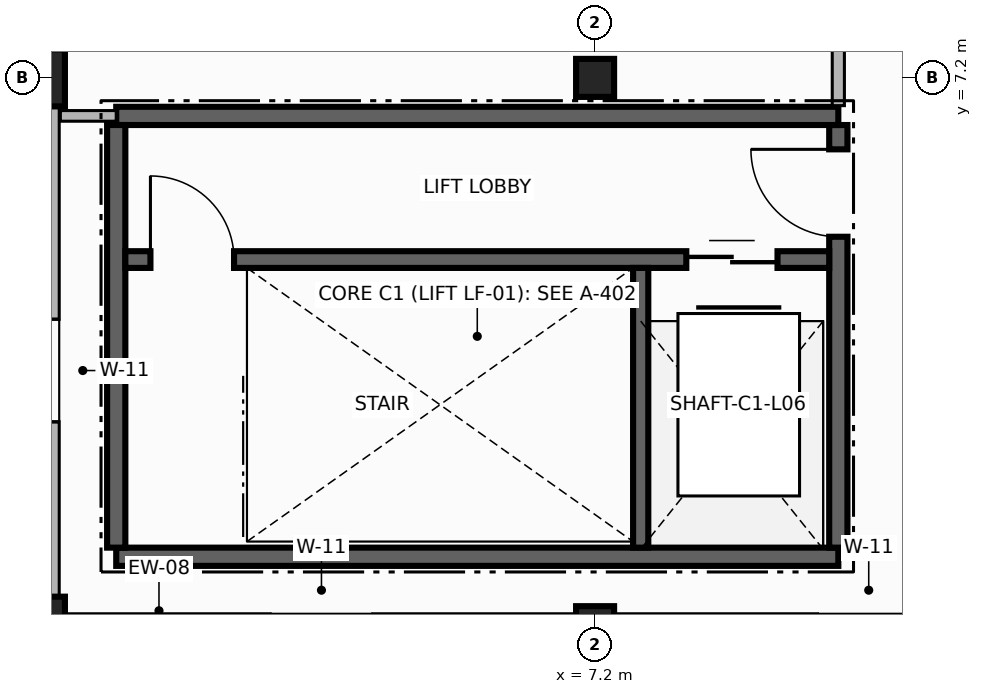
"""IFC4 building model, lengths in metres.
Left out: names, types, materials, properties, quantities, classifications, styles, units other than length and angle.
Written with IfcOpenShell. Run it as: python <this file> out.ifc"""

import sys

from ifc_helpers import new_model, si_unit, direction, frame, frame_2d, origin, origin_with_axes, origin_2d, place, context, subcontext, project, spatial, rectangle, extrude, element, fill, save


model = new_model("IFC4")
c1 = context("Model", 3, precision=1e-05, world=origin(), true_north=direction((0.0, 1.0)))
c2 = subcontext(c1, "Body", "Model", "MODEL_VIEW")
j1 = project(units=[si_unit("LENGTHUNIT", "METRE"), si_unit("PLANEANGLEUNIT", "RADIAN")], contexts=[c1])
p1 = place(None, origin())
s1 = spatial("IfcSite", under=j1, at=p1, CompositionType="ELEMENT")
p2 = place(p1, origin())
s2 = spatial("IfcBuilding", under=s1, at=p2, CompositionType="ELEMENT")
p3 = place(p2, frame((0.0, 0.0, 23.4)))
s3 = spatial("IfcBuildingStorey", under=s2, at=p3, CompositionType="ELEMENT", Elevation=23.4)
for number, where, z_axis, x_axis in (
    (1, (0.0, 0.0, 0.0), (0.0, 0.0, 1.0), (1.0, 0.0, 0.0)),
    (2, (0.0, 7.2, 0.0), (0.0, 0.0, 1.0), (1.0, 0.0, 0.0)),
):
    element("IfcColumn", number, at=place(p3, frame(where, z_axis=z_axis, x_axis=x_axis)), inside=s3, PredefinedType="PILASTER", context=c2, shape_type="SweptSolid", body=[
        extrude(rectangle(XDim=0.45, YDim=0.75, at=origin_2d()), origin(), (0.0, 0.0, 1.0), 3.36),
    ])
for number, where, z_axis, x_axis in (
    (3, (7.2, 0.0, 0.0), (0.0, 0.0, 1.0), (1.0, 0.0, 0.0)),
    (4, (7.2, 7.2, 0.0), (0.0, 0.0, 1.0), (1.0, 0.0, 0.0)),
):
    element("IfcColumn", number, at=place(p3, frame(where, z_axis=z_axis, x_axis=x_axis)), inside=s3, PredefinedType="COLUMN", context=c2, shape_type="SweptSolid", body=[
        extrude(rectangle(XDim=0.5, YDim=0.5, at=origin_2d()), origin(), (0.0, 0.0, 1.0), 3.36),
    ])
p4 = place(p3, origin_with_axes())
e5 = element("IfcWall", 5, at=p4, inside=s3, PredefinedType="SOLIDWALL", context=c2, shape_type="SweptSolid", body=[
    extrude(rectangle(XDim=7.2, YDim=0.3, at=frame_2d((3.6, 0.0))), origin(), (0.0, 0.0, 1.0), 2.69),
])
p5 = place(p4, frame((2.925, 0.0, 0.85)))
e6 = element("IfcOpeningElement", 6, at=p5, cuts=e5, PredefinedType="OPENING", context=c2, shape_type="SweptSolid", body=[
    extrude(rectangle(XDim=1.35, YDim=1.6, at=frame_2d((0.675, 0.8))), frame((0.0, 0.16, 0.0), z_axis=(0.0, -1.0, 0.0), x_axis=(1.0, 0.0, 0.0)), (0.0, 0.0, 1.0), 0.32),
])
p6 = place(p3, frame((7.2, 0.0, 0.0), z_axis=(0.0, 0.0, 1.0), x_axis=(1.0, 0.0, 0.0)))
e7 = element("IfcWall", 7, at=p6, inside=s3, PredefinedType="SOLIDWALL", context=c2, shape_type="SweptSolid", body=[
    extrude(rectangle(XDim=7.2, YDim=0.3, at=frame_2d((3.6, 0.0))), origin(), (0.0, 0.0, 1.0), 2.69),
])
p7 = place(p6, frame((2.925, 0.0, 0.85)))
e8 = element("IfcOpeningElement", 8, at=p7, cuts=e7, PredefinedType="OPENING", context=c2, shape_type="SweptSolid", body=[
    extrude(rectangle(XDim=1.35, YDim=1.6, at=frame_2d((0.675, 0.8))), frame((0.0, 0.16, 0.0), z_axis=(0.0, -1.0, 0.0), x_axis=(1.0, 0.0, 0.0)), (0.0, 0.0, 1.0), 0.32),
])
p8 = place(p3, frame((0.0, 14.4, 0.0), z_axis=(0.0, 0.0, 1.0), x_axis=(0.0, -1.0, 0.0)))
e9 = element("IfcWall", 9, at=p8, inside=s3, PredefinedType="SOLIDWALL", context=c2, shape_type="SweptSolid", body=[
    extrude(rectangle(XDim=7.2, YDim=0.3, at=frame_2d((3.6, 0.0))), origin(), (0.0, 0.0, 1.0), 2.69),
])
p9 = place(p8, frame((2.925, 0.0, 0.85)))
e10 = element("IfcOpeningElement", 10, at=p9, cuts=e9, PredefinedType="OPENING", context=c2, shape_type="SweptSolid", body=[
    extrude(rectangle(XDim=1.35, YDim=1.6, at=frame_2d((0.675, 0.8))), frame((0.0, 0.16, 0.0), z_axis=(0.0, -1.0, 0.0), x_axis=(1.0, 0.0, 0.0)), (0.0, 0.0, 1.0), 0.32),
])
p10 = place(p3, frame((0.0, 7.2, 0.0), z_axis=(0.0, 0.0, 1.0), x_axis=(0.0, -1.0, 0.0)))
e11 = element("IfcWall", 11, at=p10, inside=s3, PredefinedType="SOLIDWALL", context=c2, shape_type="SweptSolid", body=[
    extrude(rectangle(XDim=7.2, YDim=0.3, at=frame_2d((3.6, 0.0))), origin(), (0.0, 0.0, 1.0), 2.69),
])
p11 = place(p10, frame((3.175, 0.0, 0.85)))
e12 = element("IfcOpeningElement", 12, at=p11, cuts=e11, PredefinedType="OPENING", context=c2, shape_type="SweptSolid", body=[
    extrude(rectangle(XDim=1.35, YDim=1.6, at=frame_2d((0.675, 0.8))), frame((0.0, 0.16, 0.0), z_axis=(0.0, -1.0, 0.0), x_axis=(1.0, 0.0, 0.0)), (0.0, 0.0, 1.0), 0.32),
])
p12 = place(p3, frame((0.9, 0.9, 0.0), z_axis=(0.0, 0.0, 1.0), x_axis=(1.0, 0.0, 0.0)))
e13 = element("IfcWall", 13, at=p12, inside=s3, PredefinedType="SHEAR", context=c2, shape_type="SweptSolid", body=[
    extrude(rectangle(XDim=9.5, YDim=0.24, at=frame_2d((4.75, 0.0))), origin(), (0.0, 0.0, 1.0), 3.36),
])
p13 = place(p3, frame((10.4, 1.02, 0.0), z_axis=(0.0, 0.0, 1.0), x_axis=(0.0, 1.0, 0.0)))
e14 = element("IfcWall", 14, at=p13, inside=s3, PredefinedType="SHEAR", context=c2, shape_type="SweptSolid", body=[
    extrude(rectangle(XDim=5.56, YDim=0.24, at=frame_2d((2.78, 0.0))), origin(), (0.0, 0.0, 1.0), 3.36),
])
p14 = place(p13, frame((4.09, 0.0, 0.0)))
e15 = element("IfcOpeningElement", 15, at=p14, cuts=e14, PredefinedType="OPENING", context=c2, shape_type="SweptSolid", body=[
    extrude(rectangle(XDim=1.15, YDim=2.2, at=frame_2d((0.575, 1.1))), frame((0.0, 0.13, 0.0), z_axis=(0.0, -1.0, 0.0), x_axis=(1.0, 0.0, 0.0)), (0.0, 0.0, 1.0), 0.26),
])
p15 = place(p3, frame((10.4, 6.7, 0.0), z_axis=(0.0, 0.0, 1.0), x_axis=(-1.0, 0.0, 0.0)))
e16 = element("IfcWall", 16, at=p15, inside=s3, PredefinedType="SHEAR", context=c2, shape_type="SweptSolid", body=[
    extrude(rectangle(XDim=9.5, YDim=0.24, at=frame_2d((4.75, 0.0))), origin(), (0.0, 0.0, 1.0), 3.36),
])
p16 = place(p3, frame((0.9, 6.58, 0.0), z_axis=(0.0, 0.0, 1.0), x_axis=(0.0, -1.0, 0.0)))
e17 = element("IfcWall", 17, at=p16, inside=s3, PredefinedType="SHEAR", context=c2, shape_type="SweptSolid", body=[
    extrude(rectangle(XDim=5.56, YDim=0.24, at=frame_2d((2.78, 0.0))), origin(), (0.0, 0.0, 1.0), 3.36),
])
p17 = place(p3, frame((1.02, 4.81, 0.0), z_axis=(0.0, 0.0, 1.0), x_axis=(1.0, 0.0, 0.0)))
e18 = element("IfcWall", 18, at=p17, inside=s3, PredefinedType="SHEAR", context=c2, shape_type="SweptSolid", body=[
    extrude(rectangle(XDim=9.26, YDim=0.22, at=frame_2d((4.63, 0.0))), origin(), (0.0, 0.0, 1.0), 3.36),
])
p18 = place(p17, frame((0.33, 0.0, 0.0)))
e19 = element("IfcOpeningElement", 19, at=p18, cuts=e18, PredefinedType="OPENING", context=c2, shape_type="SweptSolid", body=[
    extrude(rectangle(XDim=1.1, YDim=2.15, at=frame_2d((0.55, 1.075))), frame((0.0, 0.12, 0.0), z_axis=(0.0, -1.0, 0.0), x_axis=(1.0, 0.0, 0.0)), (0.0, 0.0, 1.0), 0.24),
])
p19 = place(p17, frame((7.38, 0.0, 0.0)))
e20 = element("IfcOpeningElement", 20, at=p19, cuts=e18, PredefinedType="OPENING", context=c2, shape_type="SweptSolid", body=[
    extrude(rectangle(XDim=1.2, YDim=2.2, at=frame_2d((0.6, 1.1))), frame((0.0, 0.12, 0.0), z_axis=(0.0, -1.0, 0.0), x_axis=(1.0, 0.0, 0.0)), (0.0, 0.0, 1.0), 0.24),
])
p20 = place(p3, frame((7.8, 1.02, 0.0), z_axis=(0.0, 0.0, 1.0), x_axis=(0.0, 1.0, 0.0)))
e21 = element("IfcWall", 21, at=p20, inside=s3, PredefinedType="SHEAR", context=c2, shape_type="SweptSolid", body=[
    extrude(rectangle(XDim=3.68, YDim=0.2, at=frame_2d((1.84, 0.0))), origin(), (0.0, 0.0, 1.0), 3.36),
])
p21 = place(p3, frame((10.4, 7.788, 0.0), z_axis=(0.0, 0.0, 1.0), x_axis=(0.0, -1.0, 0.0)))
e22 = element("IfcWall", 22, at=p21, inside=s3, PredefinedType="PARTITIONING", context=c2, shape_type="SweptSolid", body=[
    extrude(rectangle(XDim=0.953, YDim=0.16, at=frame_2d((0.477, 0.0))), origin(), (0.0, 0.0, 1.0), 2.68),
])
p22 = place(p3, frame((0.9, 6.7, 0.0), z_axis=(0.0, 0.0, 1.0), x_axis=(-1.0, 0.0, 0.0)))
e23 = element("IfcWall", 23, at=p22, inside=s3, PredefinedType="PARTITIONING", context=c2, shape_type="SweptSolid", body=[
    extrude(rectangle(XDim=0.735, YDim=0.14, at=frame_2d((0.367, 0.0))), origin(), (0.0, 0.0, 1.0), 2.68),
])
p23 = place(p18, origin())
e24 = element("IfcDoor", 24, at=p23, inside=s3, OperationType="SINGLE_SWING_LEFT", PredefinedType="DOOR", context=c2, shape_type="SweptSolid", body=[
    extrude(rectangle(XDim=1.1, YDim=2.15, at=frame_2d((0.55, 1.075))), frame((0.0, 0.025, 0.0), z_axis=(0.0, -1.0, 0.0), x_axis=(1.0, 0.0, 0.0)), (0.0, 0.0, 1.0), 0.05),
])
fill(e19, e24)
p24 = place(p19, origin())
e25 = element("IfcDoor", 25, at=p24, inside=s3, OperationType="DOUBLE_DOOR_SLIDING", PredefinedType="DOOR", context=c2, shape_type="SweptSolid", body=[
    extrude(rectangle(XDim=1.2, YDim=2.2, at=frame_2d((0.6, 1.1))), frame((0.0, 0.025, 0.0), z_axis=(0.0, -1.0, 0.0), x_axis=(1.0, 0.0, 0.0)), (0.0, 0.0, 1.0), 0.05),
])
fill(e20, e25)
p25 = place(p14, origin())
e26 = element("IfcDoor", 26, at=p25, inside=s3, OperationType="SINGLE_SWING_RIGHT", PredefinedType="DOOR", context=c2, shape_type="SweptSolid", body=[
    extrude(rectangle(XDim=1.15, YDim=2.2, at=frame_2d((0.575, 1.1))), frame((0.0, 0.025, 0.0), z_axis=(0.0, -1.0, 0.0), x_axis=(1.0, 0.0, 0.0)), (0.0, 0.0, 1.0), 0.05),
])
fill(e15, e26)
save(model, sys.argv[1])
